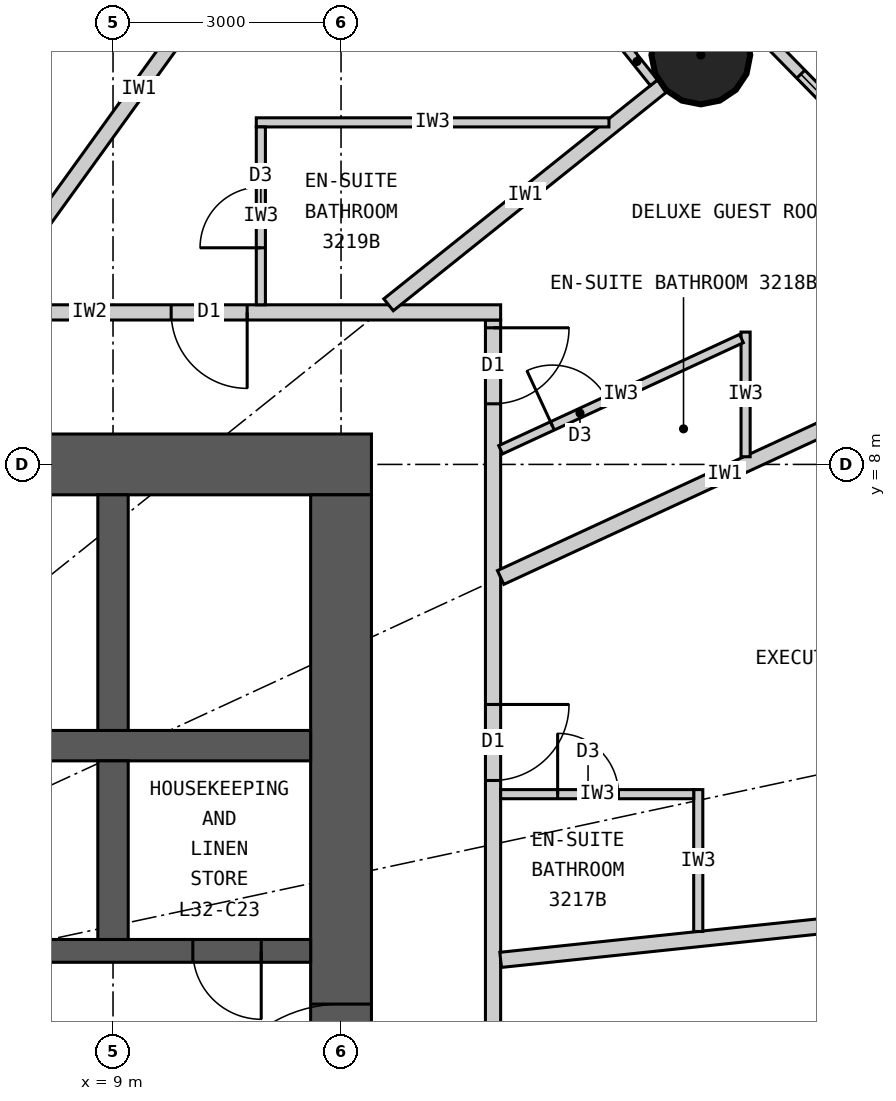
"""IFC4 building model, lengths in metres.
Left out: names, types, materials, properties, quantities, classifications, styles, units other than length and angle.
Written with IfcOpenShell. Run it as: python <this file> out.ifc"""

import sys

from ifc_helpers import new_model, si_unit, direction, frame, frame_2d, origin, origin_2d, place, context, subcontext, project, spatial, rectangle, circle, extrude, element, fill, save


model = new_model("IFC4")
c1 = context("Model", 3, precision=1e-05, world=origin(), true_north=direction((0.0, 1.0)))
c2 = subcontext(c1, "Body", "Model", "MODEL_VIEW")
j1 = project(units=[si_unit("LENGTHUNIT", "METRE"), si_unit("PLANEANGLEUNIT", "RADIAN")], contexts=[c1])
p1 = place(None, origin())
s1 = spatial("IfcSite", under=j1, at=p1, CompositionType="ELEMENT")
p2 = place(p1, origin())
s2 = spatial("IfcBuilding", under=s1, at=p2, CompositionType="ELEMENT")
p3 = place(p2, frame((0.0, 0.0, 125.4)))
s3 = spatial("IfcBuildingStorey", under=s2, at=p3, CompositionType="ELEMENT", Elevation=125.4)
p4 = place(p3, frame((16.734, 13.387, 0.0), z_axis=(0.0, 0.0, 1.0), x_axis=(1.0, 0.0, 0.0)))
e1 = element("IfcColumn", 1, at=p4, inside=s3, PredefinedType="COLUMN", context=c2, shape_type="SweptSolid", body=[
    extrude(circle(Radius=0.65, at=origin_2d()), origin(), (0.0, 0.0, 1.0), 3.3),
])
p5 = place(p3, frame((-12.4, 8.0, 0.0), z_axis=(0.0, 0.0, 1.0), x_axis=(1.0, 0.0, 0.0)))
e2 = element("IfcWall", 2, at=p5, inside=s3, PredefinedType="SHEAR", context=c2, shape_type="SweptSolid", body=[
    extrude(rectangle(XDim=24.8, YDim=0.8, at=frame_2d((12.4, 0.0))), origin(), (0.0, 0.0, 1.0), 3.3),
])
p6 = place(p5, frame((11.1, 0.0, 0.0)))
e3 = element("IfcOpeningElement", 3, at=p6, cuts=e2, PredefinedType="OPENING", context=c2, shape_type="SweptSolid", body=[
    extrude(rectangle(XDim=1.2, YDim=2.2, at=frame_2d((0.6, 1.1))), frame((0.0, 0.41, 0.0), z_axis=(0.0, -1.0, 0.0), x_axis=(1.0, 0.0, 0.0)), (0.0, 0.0, 1.0), 0.82),
])
p7 = place(p5, frame((18.7, 0.0, 0.0)))
e4 = element("IfcOpeningElement", 4, at=p7, cuts=e2, PredefinedType="OPENING", context=c2, shape_type="SweptSolid", body=[
    extrude(rectangle(XDim=0.9, YDim=2.2, at=frame_2d((0.45, 1.1))), frame((0.0, 0.41, 0.0), z_axis=(0.0, -1.0, 0.0), x_axis=(1.0, 0.0, 0.0)), (0.0, 0.0, 1.0), 0.82),
])
p8 = place(p3, frame((12.0, -7.6, 0.0), z_axis=(0.0, 0.0, 1.0), x_axis=(0.0, 1.0, 0.0)))
e5 = element("IfcWall", 5, at=p8, inside=s3, PredefinedType="SHEAR", context=c2, shape_type="SweptSolid", body=[
    extrude(rectangle(XDim=15.2, YDim=0.8, at=frame_2d((7.6, 0.0))), origin(), (0.0, 0.0, 1.0), 3.3),
])
p9 = place(p8, frame((6.7, 0.0, 0.0)))
e6 = element("IfcOpeningElement", 6, at=p9, cuts=e5, PredefinedType="OPENING", context=c2, shape_type="SweptSolid", body=[
    extrude(rectangle(XDim=1.8, YDim=2.2, at=frame_2d((0.9, 1.1))), frame((0.0, 0.41, 0.0), z_axis=(0.0, -1.0, 0.0), x_axis=(1.0, 0.0, 0.0)), (0.0, 0.0, 1.0), 0.82),
])
p10 = place(p3, frame((-11.6, 4.3, 0.0), z_axis=(0.0, 0.0, 1.0), x_axis=(1.0, 0.0, 0.0)))
e7 = element("IfcWall", 7, at=p10, inside=s3, PredefinedType="SHEAR", context=c2, shape_type="SweptSolid", body=[
    extrude(rectangle(XDim=23.2, YDim=0.4, at=frame_2d((11.6, 0.0))), origin(), (0.0, 0.0, 1.0), 3.3),
])
p11 = place(p3, frame((-11.6, 1.6, 0.0), z_axis=(0.0, 0.0, 1.0), x_axis=(1.0, 0.0, 0.0)))
e8 = element("IfcWall", 8, at=p11, inside=s3, PredefinedType="SHEAR", context=c2, shape_type="SweptSolid", body=[
    extrude(rectangle(XDim=23.2, YDim=0.3, at=frame_2d((11.6, 0.0))), origin(), (0.0, 0.0, 1.0), 3.3),
])
p12 = place(p11, frame((6.55, 0.0, 0.0)))
e9 = element("IfcOpeningElement", 9, at=p12, cuts=e8, PredefinedType="OPENING", context=c2, shape_type="SweptSolid", body=[
    extrude(rectangle(XDim=1.1, YDim=2.2, at=frame_2d((0.55, 1.1))), frame((0.0, 0.16, 0.0), z_axis=(0.0, -1.0, 0.0), x_axis=(1.0, 0.0, 0.0)), (0.0, 0.0, 1.0), 0.32),
])
p13 = place(p11, frame((0.65, 0.0, 0.0)))
e10 = element("IfcOpeningElement", 10, at=p13, cuts=e8, PredefinedType="OPENING", context=c2, shape_type="SweptSolid", body=[
    extrude(rectangle(XDim=0.9, YDim=2.2, at=frame_2d((0.45, 1.1))), frame((0.0, 0.16, 0.0), z_axis=(0.0, -1.0, 0.0), x_axis=(1.0, 0.0, 0.0)), (0.0, 0.0, 1.0), 0.32),
])
p14 = place(p11, frame((3.65, 0.0, 0.0)))
e11 = element("IfcOpeningElement", 11, at=p14, cuts=e8, PredefinedType="OPENING", context=c2, shape_type="SweptSolid", body=[
    extrude(rectangle(XDim=0.9, YDim=2.2, at=frame_2d((0.45, 1.1))), frame((0.0, 0.16, 0.0), z_axis=(0.0, -1.0, 0.0), x_axis=(1.0, 0.0, 0.0)), (0.0, 0.0, 1.0), 0.32),
])
p15 = place(p11, frame((21.65, 0.0, 0.0)))
e12 = element("IfcOpeningElement", 12, at=p15, cuts=e8, PredefinedType="OPENING", context=c2, shape_type="SweptSolid", body=[
    extrude(rectangle(XDim=0.9, YDim=2.2, at=frame_2d((0.45, 1.1))), frame((0.0, 0.16, 0.0), z_axis=(0.0, -1.0, 0.0), x_axis=(1.0, 0.0, 0.0)), (0.0, 0.0, 1.0), 0.32),
])
p16 = place(p3, frame((9.0, 4.5, 0.0), z_axis=(0.0, 0.0, 1.0), x_axis=(0.0, 1.0, 0.0)))
e13 = element("IfcWall", 13, at=p16, inside=s3, PredefinedType="SHEAR", context=c2, shape_type="SweptSolid", body=[
    extrude(rectangle(XDim=3.1, YDim=0.4, at=frame_2d((1.55, 0.0))), origin(), (0.0, 0.0, 1.0), 3.3),
])
p17 = place(p3, frame((9.0, 1.75, 0.0), z_axis=(0.0, 0.0, 1.0), x_axis=(0.0, 1.0, 0.0)))
e14 = element("IfcWall", 14, at=p17, inside=s3, PredefinedType="SHEAR", context=c2, shape_type="SweptSolid", body=[
    extrude(rectangle(XDim=2.35, YDim=0.4, at=frame_2d((1.175, 0.0))), origin(), (0.0, 0.0, 1.0), 3.3),
])
p18 = place(p3, frame((21.287, 9.832, 0.0), z_axis=(0.0, 0.0, 1.0), x_axis=(-0.700136650834, 0.714008872605, 0.0)))
e15 = element("IfcWall", 15, at=p18, inside=s3, PredefinedType="ELEMENTEDWALL", context=c2, shape_type="SweptSolid", body=[
    extrude(rectangle(XDim=5.649, YDim=0.15, at=frame_2d((2.825, 0.0))), origin(), (0.0, 0.0, 1.0), 3.12),
])
p19 = place(p18, frame((1.025, 0.0, 0.9)))
e16 = element("IfcOpeningElement", 16, at=p19, cuts=e15, PredefinedType="OPENING", context=c2, shape_type="SweptSolid", body=[
    extrude(rectangle(XDim=1.5, YDim=1.9, at=frame_2d((0.75, 0.95))), frame((0.0, 0.085, 0.0), z_axis=(0.0, -1.0, 0.0), x_axis=(1.0, 0.0, 0.0)), (0.0, 0.0, 1.0), 0.17),
])
p20 = place(p18, frame((3.125, 0.0, 0.9)))
e17 = element("IfcOpeningElement", 17, at=p20, cuts=e15, PredefinedType="OPENING", context=c2, shape_type="SweptSolid", body=[
    extrude(rectangle(XDim=1.5, YDim=1.9, at=frame_2d((0.75, 0.95))), frame((0.0, 0.085, 0.0), z_axis=(0.0, -1.0, 0.0), x_axis=(1.0, 0.0, 0.0)), (0.0, 0.0, 1.0), 0.17),
])
p21 = place(p3, frame((14.0, -9.9, 0.0), z_axis=(0.0, 0.0, 1.0), x_axis=(0.0, 1.0, 0.0)))
e18 = element("IfcWall", 18, at=p21, inside=s3, PredefinedType="PARTITIONING", context=c2, shape_type="SweptSolid", body=[
    extrude(rectangle(XDim=19.8, YDim=0.2, at=frame_2d((9.9, 0.0))), origin(), (0.0, 0.0, 1.0), 3.12),
])
p22 = place(p21, frame((2.478, 0.0, 0.0)))
e19 = element("IfcOpeningElement", 19, at=p22, cuts=e18, PredefinedType="OPENING", context=c2, shape_type="SweptSolid", body=[
    extrude(rectangle(XDim=1.0, YDim=2.2, at=frame_2d((0.5, 1.1))), frame((0.0, 0.11, 0.0), z_axis=(0.0, -1.0, 0.0), x_axis=(1.0, 0.0, 0.0)), (0.0, 0.0, 1.0), 0.22),
])
p23 = place(p21, frame((8.838, 0.0, 0.0)))
e20 = element("IfcOpeningElement", 20, at=p23, cuts=e18, PredefinedType="OPENING", context=c2, shape_type="SweptSolid", body=[
    extrude(rectangle(XDim=1.0, YDim=2.2, at=frame_2d((0.5, 1.1))), frame((0.0, 0.11, 0.0), z_axis=(0.0, -1.0, 0.0), x_axis=(1.0, 0.0, 0.0)), (0.0, 0.0, 1.0), 0.22),
])
p24 = place(p21, frame((13.742, 0.0, 0.0)))
e21 = element("IfcOpeningElement", 21, at=p24, cuts=e18, PredefinedType="OPENING", context=c2, shape_type="SweptSolid", body=[
    extrude(rectangle(XDim=1.0, YDim=2.2, at=frame_2d((0.5, 1.1))), frame((0.0, 0.11, 0.0), z_axis=(0.0, -1.0, 0.0), x_axis=(1.0, 0.0, 0.0)), (0.0, 0.0, 1.0), 0.22),
])
p25 = place(p21, frame((18.698, 0.0, 0.0)))
e22 = element("IfcOpeningElement", 22, at=p25, cuts=e18, PredefinedType="OPENING", context=c2, shape_type="SweptSolid", body=[
    extrude(rectangle(XDim=1.0, YDim=2.2, at=frame_2d((0.5, 1.1))), frame((0.0, 0.11, 0.0), z_axis=(0.0, -1.0, 0.0), x_axis=(1.0, 0.0, 0.0)), (0.0, 0.0, 1.0), 0.22),
])
p26 = place(p3, frame((3.283, 10.0, 0.0), z_axis=(0.0, 0.0, 1.0), x_axis=(1.0, 0.0, 0.0)))
e23 = element("IfcWall", 23, at=p26, inside=s3, PredefinedType="PARTITIONING", context=c2, shape_type="SweptSolid", body=[
    extrude(rectangle(XDim=10.817, YDim=0.2, at=frame_2d((5.409, 0.0))), origin(), (0.0, 0.0, 1.0), 3.12),
])
p27 = place(p26, frame((6.482, 0.0, 0.0)))
e24 = element("IfcOpeningElement", 24, at=p27, cuts=e23, PredefinedType="OPENING", context=c2, shape_type="SweptSolid", body=[
    extrude(rectangle(XDim=1.0, YDim=2.2, at=frame_2d((0.5, 1.1))), frame((0.0, 0.11, 0.0), z_axis=(0.0, -1.0, 0.0), x_axis=(1.0, 0.0, 0.0)), (0.0, 0.0, 1.0), 0.22),
])
p28 = place(p3, frame((14.1, 1.482, 0.0), z_axis=(0.0, 0.0, 1.0), x_axis=(0.994523202615, 0.104516024894, 0.0)))
e25 = element("IfcWall", 25, at=p28, inside=s3, PredefinedType="PARTITIONING", context=c2, shape_type="SweptSolid", body=[
    extrude(rectangle(XDim=10.091, YDim=0.2, at=frame_2d((5.045, 0.0))), origin(), (0.0, 0.0, 1.0), 2.47),
])
p29 = place(p3, frame((14.1, 6.512, 0.0), z_axis=(0.0, 0.0, 1.0), x_axis=(0.907833019998, 0.419331858797, 0.0)))
e26 = element("IfcWall", 26, at=p29, inside=s3, PredefinedType="PARTITIONING", context=c2, shape_type="SweptSolid", body=[
    extrude(rectangle(XDim=6.505, YDim=0.2, at=frame_2d((3.252, 0.0))), origin(), (0.0, 0.0, 1.0), 2.27),
])
p30 = place(p3, frame((12.625, 10.1, 0.0), z_axis=(0.0, 0.0, 1.0), x_axis=(0.780863644897, 0.624701503182, 0.0)))
e27 = element("IfcWall", 27, at=p30, inside=s3, PredefinedType="PARTITIONING", context=c2, shape_type="SweptSolid", body=[
    extrude(rectangle(XDim=4.612, YDim=0.2, at=frame_2d((2.306, 0.0))), origin(), (0.0, 0.0, 1.0), 2.37),
])
p31 = place(p3, frame((7.289, 10.1, 0.0), z_axis=(0.0, 0.0, 1.0), x_axis=(0.585217367024, 0.81087645997, 0.0)))
e28 = element("IfcWall", 28, at=p31, inside=s3, PredefinedType="PARTITIONING", context=c2, shape_type="SweptSolid", body=[
    extrude(rectangle(XDim=7.016, YDim=0.2, at=frame_2d((3.508, 0.0))), origin(), (0.0, 0.0, 1.0), 2.37),
])
p32 = place(p3, frame((16.7, 1.855, 0.0), z_axis=(0.0, 0.0, 1.0), x_axis=(0.0, 1.0, 0.0)))
e29 = element("IfcWall", 29, at=p32, inside=s3, PredefinedType="PARTITIONING", context=c2, shape_type="SweptSolid", body=[
    extrude(rectangle(XDim=1.867, YDim=0.12, at=frame_2d((0.933, 0.0))), origin(), (0.0, 0.0, 1.0), 3.12),
])
p33 = place(p3, frame((14.1, 3.662, 0.0), z_axis=(0.0, 0.0, 1.0), x_axis=(1.0, 0.0, 0.0)))
e30 = element("IfcWall", 30, at=p33, inside=s3, PredefinedType="PARTITIONING", context=c2, shape_type="SweptSolid", body=[
    extrude(rectangle(XDim=2.54, YDim=0.12, at=frame_2d((1.27, 0.0))), origin(), (0.0, 0.0, 1.0), 2.37),
])
p34 = place(p33, frame((0.75, 0.0, 0.0)))
e31 = element("IfcOpeningElement", 31, at=p34, cuts=e30, PredefinedType="OPENING", context=c2, shape_type="SweptSolid", body=[
    extrude(rectangle(XDim=0.8, YDim=2.1, at=frame_2d((0.4, 1.05))), frame((0.0, 0.07, 0.0), z_axis=(0.0, -1.0, 0.0), x_axis=(1.0, 0.0, 0.0)), (0.0, 0.0, 1.0), 0.14),
])
p35 = place(p3, frame((17.323, 8.101, 0.0), z_axis=(0.0, 0.0, 1.0), x_axis=(0.0, 1.0, 0.0)))
e32 = element("IfcWall", 32, at=p35, inside=s3, PredefinedType="PARTITIONING", context=c2, shape_type="SweptSolid", body=[
    extrude(rectangle(XDim=1.64, YDim=0.12, at=frame_2d((0.82, 0.0))), origin(), (0.0, 0.0, 1.0), 3.12),
])
p36 = place(p3, frame((14.1, 8.193, 0.0), z_axis=(0.0, 0.0, 1.0), x_axis=(0.907836493557, 0.419324338628, 0.0)))
e33 = element("IfcWall", 33, at=p36, inside=s3, PredefinedType="PARTITIONING", context=c2, shape_type="SweptSolid", body=[
    extrude(rectangle(XDim=3.49, YDim=0.12, at=frame_2d((1.745, 0.0))), origin(), (0.0, 0.0, 1.0), 3.12),
])
p37 = place(p36, frame((0.75, 0.0, 0.0)))
e34 = element("IfcOpeningElement", 34, at=p37, cuts=e33, PredefinedType="OPENING", context=c2, shape_type="SweptSolid", body=[
    extrude(rectangle(XDim=0.8, YDim=2.1, at=frame_2d((0.4, 1.05))), frame((0.0, 0.07, 0.0), z_axis=(0.0, -1.0, 0.0), x_axis=(1.0, 0.0, 0.0)), (0.0, 0.0, 1.0), 0.14),
])
p38 = place(p3, frame((15.525, 12.5, 0.0), z_axis=(0.0, 0.0, 1.0), x_axis=(-1.0, 0.0, 0.0)))
e35 = element("IfcWall", 35, at=p38, inside=s3, PredefinedType="PARTITIONING", context=c2, shape_type="SweptSolid", body=[
    extrude(rectangle(XDim=4.64, YDim=0.12, at=frame_2d((2.32, 0.0))), origin(), (0.0, 0.0, 1.0), 3.12),
])
p39 = place(p3, frame((10.945, 10.1, 0.0), z_axis=(0.0, 0.0, 1.0), x_axis=(0.0, 1.0, 0.0)))
e36 = element("IfcWall", 36, at=p39, inside=s3, PredefinedType="PARTITIONING", context=c2, shape_type="SweptSolid", body=[
    extrude(rectangle(XDim=2.34, YDim=0.12, at=frame_2d((1.17, 0.0))), origin(), (0.0, 0.0, 1.0), 3.12),
])
p40 = place(p39, frame((0.75, 0.0, 0.0)))
e37 = element("IfcOpeningElement", 37, at=p40, cuts=e36, PredefinedType="OPENING", context=c2, shape_type="SweptSolid", body=[
    extrude(rectangle(XDim=0.8, YDim=2.1, at=frame_2d((0.4, 1.05))), frame((0.0, 0.07, 0.0), z_axis=(0.0, -1.0, 0.0), x_axis=(1.0, 0.0, 0.0)), (0.0, 0.0, 1.0), 0.14),
])
p41 = place(p3, frame((16.117, 13.022, 0.0), z_axis=(0.0, 0.0, 1.0), x_axis=(-0.62465344249, 0.780902091677, 0.0)))
e38 = element("IfcWall", 38, at=p41, inside=s3, PredefinedType="PARTITIONING", context=c2, shape_type="SweptSolid", body=[
    extrude(rectangle(XDim=0.716, YDim=0.12, at=frame_2d((0.358, 0.0))), origin(), (0.0, 0.0, 1.0), 3.12),
])
p42 = place(p20, origin())
e39 = element("IfcWindow", 39, at=p42, inside=s3, PartitioningType="SINGLE_PANEL", PredefinedType="WINDOW", context=c2, shape_type="SweptSolid", body=[
    extrude(rectangle(XDim=1.5, YDim=1.9, at=frame_2d((0.75, 0.95))), frame((0.0, 0.03, 0.0), z_axis=(0.0, -1.0, 0.0), x_axis=(1.0, 0.0, 0.0)), (0.0, 0.0, 1.0), 0.06),
])
fill(e17, e39)
p43 = place(p34, origin())
e40 = element("IfcDoor", 40, at=p43, inside=s3, OperationType="SINGLE_SWING_LEFT", PredefinedType="DOOR", context=c2, shape_type="SweptSolid", body=[
    extrude(rectangle(XDim=0.8, YDim=2.1, at=frame_2d((0.4, 1.05))), frame((0.0, 0.025, 0.0), z_axis=(0.0, -1.0, 0.0), x_axis=(1.0, 0.0, 0.0)), (0.0, 0.0, 1.0), 0.05),
])
fill(e31, e40)
p44 = place(p24, origin())
e41 = element("IfcDoor", 41, at=p44, inside=s3, OperationType="SINGLE_SWING_RIGHT", PredefinedType="DOOR", context=c2, shape_type="SweptSolid", body=[
    extrude(rectangle(XDim=1.0, YDim=2.2, at=frame_2d((0.5, 1.1))), frame((0.0, 0.025, 0.0), z_axis=(0.0, -1.0, 0.0), x_axis=(1.0, 0.0, 0.0)), (0.0, 0.0, 1.0), 0.05),
])
fill(e21, e41)
p45 = place(p37, origin())
e42 = element("IfcDoor", 42, at=p45, inside=s3, OperationType="SINGLE_SWING_LEFT", PredefinedType="DOOR", context=c2, shape_type="SweptSolid", body=[
    extrude(rectangle(XDim=0.8, YDim=2.1, at=frame_2d((0.4, 1.05))), frame((0.0, 0.025, 0.0), z_axis=(0.0, -1.0, 0.0), x_axis=(1.0, 0.0, 0.0)), (0.0, 0.0, 1.0), 0.05),
])
fill(e34, e42)
p46 = place(p25, origin())
e43 = element("IfcDoor", 43, at=p46, inside=s3, OperationType="SINGLE_SWING_RIGHT", PredefinedType="DOOR", context=c2, shape_type="SweptSolid", body=[
    extrude(rectangle(XDim=1.0, YDim=2.2, at=frame_2d((0.5, 1.1))), frame((0.0, 0.025, 0.0), z_axis=(0.0, -1.0, 0.0), x_axis=(1.0, 0.0, 0.0)), (0.0, 0.0, 1.0), 0.05),
])
fill(e22, e43)
p47 = place(p40, origin())
e44 = element("IfcDoor", 44, at=p47, inside=s3, OperationType="SINGLE_SWING_LEFT", PredefinedType="DOOR", context=c2, shape_type="SweptSolid", body=[
    extrude(rectangle(XDim=0.8, YDim=2.1, at=frame_2d((0.4, 1.05))), frame((0.0, 0.025, 0.0), z_axis=(0.0, -1.0, 0.0), x_axis=(1.0, 0.0, 0.0)), (0.0, 0.0, 1.0), 0.05),
])
fill(e37, e44)
p48 = place(p27, origin())
e45 = element("IfcDoor", 45, at=p48, inside=s3, OperationType="SINGLE_SWING_RIGHT", PredefinedType="DOOR", context=c2, shape_type="SweptSolid", body=[
    extrude(rectangle(XDim=1.0, YDim=2.2, at=frame_2d((0.5, 1.1))), frame((0.0, 0.025, 0.0), z_axis=(0.0, -1.0, 0.0), x_axis=(1.0, 0.0, 0.0)), (0.0, 0.0, 1.0), 0.05),
])
fill(e24, e45)
p49 = place(p15, origin())
e46 = element("IfcDoor", 46, at=p49, inside=s3, OperationType="SINGLE_SWING_RIGHT", PredefinedType="DOOR", context=c2, shape_type="SweptSolid", body=[
    extrude(rectangle(XDim=0.9, YDim=2.2, at=frame_2d((0.45, 1.1))), frame((0.0, 0.025, 0.0), z_axis=(0.0, -1.0, 0.0), x_axis=(1.0, 0.0, 0.0)), (0.0, 0.0, 1.0), 0.05),
])
fill(e12, e46)
p50 = place(p9, origin())
e47 = element("IfcDoor", 47, at=p50, inside=s3, OperationType="DOUBLE_DOOR_DOUBLE_SWING", PredefinedType="DOOR", context=c2, shape_type="SweptSolid", body=[
    extrude(rectangle(XDim=1.8, YDim=2.2, at=frame_2d((0.9, 1.1))), frame((0.0, 0.025, 0.0), z_axis=(0.0, -1.0, 0.0), x_axis=(1.0, 0.0, 0.0)), (0.0, 0.0, 1.0), 0.05),
])
fill(e6, e47)
save(model, sys.argv[1])
